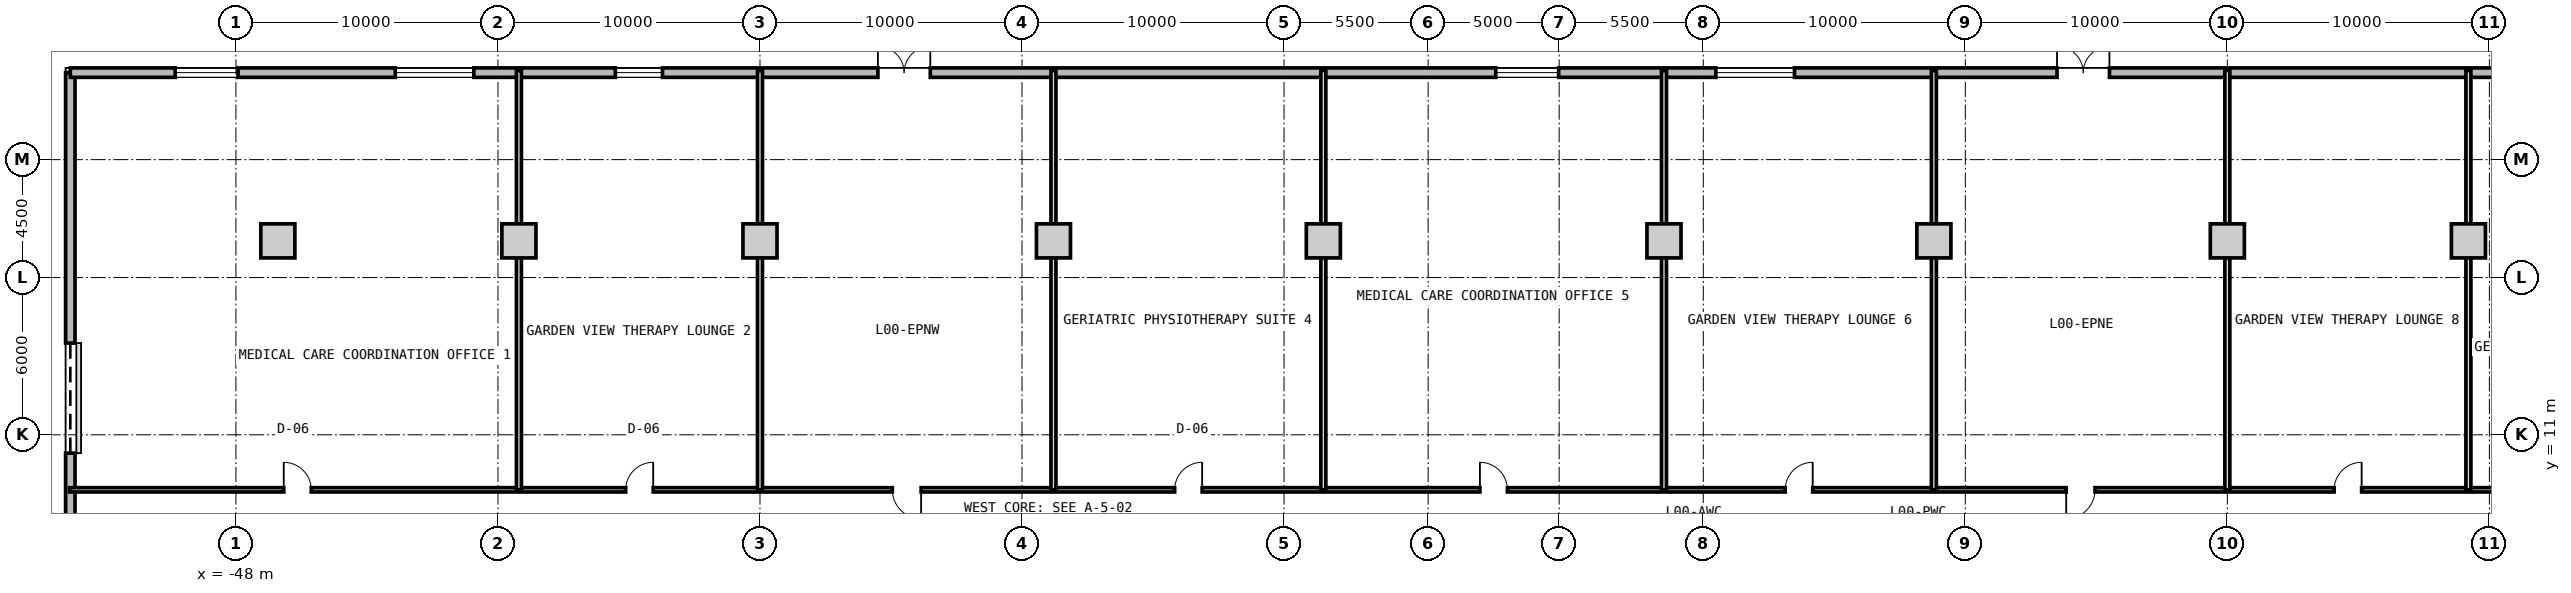
"""IFC4 building model, lengths in metres.
Left out: names, types, materials, properties, quantities, classifications, styles, units other than length and angle.
Written with IfcOpenShell. Run it as: python <this file> out.ifc"""

import sys

from ifc_helpers import new_model, si_unit, direction, frame, frame_2d, origin, origin_2d, place, context, subcontext, project, spatial, rectangle, extrude, source, transform, mapped, element, fill, save


model = new_model("IFC4")
c1 = context("Model", 3, precision=1e-05, world=origin(), true_north=direction((0.0, 1.0)))
c2 = subcontext(c1, "Body", "Model", "MODEL_VIEW")
j1 = project(units=[si_unit("LENGTHUNIT", "METRE"), si_unit("PLANEANGLEUNIT", "RADIAN")], contexts=[c1])
p1 = place(None, origin())
s1 = spatial("IfcSite", under=j1, at=p1, CompositionType="ELEMENT")
p2 = place(p1, origin())
s2 = spatial("IfcBuilding", under=s1, at=p2, CompositionType="ELEMENT")
p3 = place(p2, origin())
s3 = spatial("IfcBuildingStorey", under=s2, at=p3, CompositionType="ELEMENT", Elevation=0.0)
m1 = source(origin(), c2, "Body", "SweptSolid", [
    extrude(rectangle(XDim=1.3, YDim=1.3, at=origin_2d()), origin(), (0.0, 0.0, 1.0), 4.2),
])
for number, where, z_axis, x_axis in (
    (1, (-46.4, 18.4, 0.0), (0.0, 0.0, 1.0), (1.0, 0.0, 0.0)),
    (2, (-37.2, 18.4, 0.0), (0.0, 0.0, 1.0), (1.0, 0.0, 0.0)),
    (3, (-28.0, 18.4, 0.0), (0.0, 0.0, 1.0), (1.0, 0.0, 0.0)),
    (4, (-16.8, 18.4, 0.0), (0.0, 0.0, 1.0), (1.0, 0.0, 0.0)),
    (5, (-6.5, 18.4, 0.0), (0.0, 0.0, 1.0), (1.0, 0.0, 0.0)),
    (6, (6.5, 18.4, 0.0), (0.0, 0.0, 1.0), (1.0, 0.0, 0.0)),
    (7, (16.8, 18.4, 0.0), (0.0, 0.0, 1.0), (1.0, 0.0, 0.0)),
    (8, (28.0, 18.4, 0.0), (0.0, 0.0, 1.0), (1.0, 0.0, 0.0)),
    (9, (37.2, 18.4, 0.0), (0.0, 0.0, 1.0), (1.0, 0.0, 0.0)),
):
    element("IfcColumn", number, at=place(p3, frame(where, z_axis=z_axis, x_axis=x_axis)), inside=s3, PredefinedType="COLUMN", context=c2, shape_type="MappedRepresentation", body=[
        mapped(m1, transform((0.0, 0.0, 0.0), x_axis=(1.0, 0.0, 0.0), y_axis=(0.0, 1.0, 0.0), z_axis=(0.0, 0.0, 1.0), scale=1.0)),
    ])
m2 = source(origin(), c2, "Body", "SweptSolid", [
    extrude(rectangle(XDim=49.64, YDim=0.36, at=frame_2d((24.82, 0.0))), origin(), (0.0, 0.0, 1.0), 3.88),
])
p4 = place(p3, frame((-54.32, -24.82, 0.0), z_axis=(0.0, 0.0, 1.0), x_axis=(0.0, 1.0, 0.0)))
e10 = element("IfcWall", 10, at=p4, inside=s3, PredefinedType="SOLIDWALL", context=c2, shape_type="MappedRepresentation", body=[
    mapped(m2, transform((0.0, 0.0, 0.0), x_axis=(1.0, 0.0, 0.0), y_axis=(0.0, 1.0, 0.0), z_axis=(0.0, 0.0, 1.0), scale=1.0)),
])
p5 = place(p4, frame((14.62, 0.0, 0.0)))
e11 = element("IfcOpeningElement", 11, at=p5, cuts=e10, PredefinedType="OPENING", context=c2, shape_type="SweptSolid", body=[
    extrude(rectangle(XDim=4.2, YDim=2.7, at=frame_2d((2.1, 1.35))), frame((0.0, 0.19, 0.0), z_axis=(0.0, -1.0, 0.0), x_axis=(1.0, 0.0, 0.0)), (0.0, 0.0, 1.0), 0.38),
])
p6 = place(p4, frame((35.12, 0.0, 0.0)))
e12 = element("IfcOpeningElement", 12, at=p6, cuts=e10, PredefinedType="OPENING", context=c2, shape_type="SweptSolid", body=[
    extrude(rectangle(XDim=4.2, YDim=2.7, at=frame_2d((2.1, 1.35))), frame((0.0, 0.19, 0.0), z_axis=(0.0, -1.0, 0.0), x_axis=(1.0, 0.0, 0.0)), (0.0, 0.0, 1.0), 0.38),
])
m3 = source(origin(), c2, "Body", "SweptSolid", [
    extrude(rectangle(XDim=108.64, YDim=0.36, at=frame_2d((54.32, 0.0))), origin(), (0.0, 0.0, 1.0), 3.88),
])
p7 = place(p3, frame((-54.32, 24.82, 0.0), z_axis=(0.0, 0.0, 1.0), x_axis=(1.0, 0.0, 0.0)))
e13 = element("IfcWall", 13, at=p7, inside=s3, PredefinedType="SOLIDWALL", context=c2, shape_type="MappedRepresentation", body=[
    mapped(m3, transform((0.0, 0.0, 0.0), x_axis=(1.0, 0.0, 0.0), y_axis=(0.0, 1.0, 0.0), z_axis=(0.0, 0.0, 1.0), scale=1.0)),
])
p8 = place(p7, frame((30.82, 0.0, 0.0)))
e14 = element("IfcOpeningElement", 14, at=p8, cuts=e13, PredefinedType="OPENING", context=c2, shape_type="SweptSolid", body=[
    extrude(rectangle(XDim=2.0, YDim=2.3, at=frame_2d((1.0, 1.15))), frame((0.0, 0.19, 0.0), z_axis=(0.0, -1.0, 0.0), x_axis=(1.0, 0.0, 0.0)), (0.0, 0.0, 1.0), 0.38),
])
p9 = place(p7, frame((75.82, 0.0, 0.0)))
e15 = element("IfcOpeningElement", 15, at=p9, cuts=e13, PredefinedType="OPENING", context=c2, shape_type="SweptSolid", body=[
    extrude(rectangle(XDim=2.0, YDim=2.3, at=frame_2d((1.0, 1.15))), frame((0.0, 0.19, 0.0), z_axis=(0.0, -1.0, 0.0), x_axis=(1.0, 0.0, 0.0)), (0.0, 0.0, 1.0), 0.38),
])
p10 = place(p7, frame((4.0, 0.0, 0.85)))
e16 = element("IfcOpeningElement", 16, at=p10, cuts=e13, PredefinedType="OPENING", context=c2, shape_type="SweptSolid", body=[
    extrude(rectangle(XDim=2.4, YDim=2.2, at=frame_2d((1.2, 1.1))), frame((0.0, 0.19, 0.0), z_axis=(0.0, -1.0, 0.0), x_axis=(1.0, 0.0, 0.0)), (0.0, 0.0, 1.0), 0.38),
])
p11 = place(p7, frame((12.4, 0.0, 0.85)))
e17 = element("IfcOpeningElement", 17, at=p11, cuts=e13, PredefinedType="OPENING", context=c2, shape_type="SweptSolid", body=[
    extrude(rectangle(XDim=3.0, YDim=2.1, at=frame_2d((1.5, 1.05))), frame((0.0, 0.19, 0.0), z_axis=(0.0, -1.0, 0.0), x_axis=(1.0, 0.0, 0.0)), (0.0, 0.0, 1.0), 0.38),
])
p12 = place(p7, frame((20.8, 0.0, 0.9)))
e18 = element("IfcOpeningElement", 18, at=p12, cuts=e13, PredefinedType="OPENING", context=c2, shape_type="SweptSolid", body=[
    extrude(rectangle(XDim=1.8, YDim=2.0, at=frame_2d((0.9, 1.0))), frame((0.0, 0.19, 0.0), z_axis=(0.0, -1.0, 0.0), x_axis=(1.0, 0.0, 0.0)), (0.0, 0.0, 1.0), 0.38),
])
p13 = place(p7, frame((54.4, 0.0, 0.85)))
e19 = element("IfcOpeningElement", 19, at=p13, cuts=e13, PredefinedType="OPENING", context=c2, shape_type="SweptSolid", body=[
    extrude(rectangle(XDim=2.4, YDim=2.2, at=frame_2d((1.2, 1.1))), frame((0.0, 0.19, 0.0), z_axis=(0.0, -1.0, 0.0), x_axis=(1.0, 0.0, 0.0)), (0.0, 0.0, 1.0), 0.38),
])
p14 = place(p7, frame((62.8, 0.0, 0.85)))
e20 = element("IfcOpeningElement", 20, at=p14, cuts=e13, PredefinedType="OPENING", context=c2, shape_type="SweptSolid", body=[
    extrude(rectangle(XDim=3.0, YDim=2.1, at=frame_2d((1.5, 1.05))), frame((0.0, 0.19, 0.0), z_axis=(0.0, -1.0, 0.0), x_axis=(1.0, 0.0, 0.0)), (0.0, 0.0, 1.0), 0.38),
])
p15 = place(p7, frame((96.4, 0.0, 0.9)))
e21 = element("IfcOpeningElement", 21, at=p15, cuts=e13, PredefinedType="OPENING", context=c2, shape_type="SweptSolid", body=[
    extrude(rectangle(XDim=1.8, YDim=2.0, at=frame_2d((0.9, 1.0))), frame((0.0, 0.19, 0.0), z_axis=(0.0, -1.0, 0.0), x_axis=(1.0, 0.0, 0.0)), (0.0, 0.0, 1.0), 0.38),
])
m4 = source(origin(), c2, "Body", "SweptSolid", [
    extrude(rectangle(XDim=108.7, YDim=0.165, at=frame_2d((54.35, 0.0))), origin(), (0.0, 0.0, 1.0), 3.865),
])
p16 = place(p3, frame((-54.35, 8.9, 0.0), z_axis=(0.0, 0.0, 1.0), x_axis=(1.0, 0.0, 0.0)))
e22 = element("IfcWall", 22, at=p16, inside=s3, PredefinedType="PARTITIONING", context=c2, shape_type="MappedRepresentation", body=[
    mapped(m4, transform((0.0, 0.0, 0.0), x_axis=(1.0, 0.0, 0.0), y_axis=(0.0, 1.0, 0.0), z_axis=(0.0, 0.0, 1.0), scale=1.0)),
])
p17 = place(p16, frame((8.175, 0.0, 0.0)))
e23 = element("IfcOpeningElement", 23, at=p17, cuts=e22, PredefinedType="OPENING", context=c2, shape_type="SweptSolid", body=[
    extrude(rectangle(XDim=1.05, YDim=2.15, at=frame_2d((0.525, 1.075))), frame((0.0, 0.093, 0.0), z_axis=(0.0, -1.0, 0.0), x_axis=(1.0, 0.0, 0.0)), (0.0, 0.0, 1.0), 0.185),
])
p18 = place(p16, frame((21.225, 0.0, 0.0)))
e24 = element("IfcOpeningElement", 24, at=p18, cuts=e22, PredefinedType="OPENING", context=c2, shape_type="SweptSolid", body=[
    extrude(rectangle(XDim=1.05, YDim=2.15, at=frame_2d((0.525, 1.075))), frame((0.0, 0.093, 0.0), z_axis=(0.0, -1.0, 0.0), x_axis=(1.0, 0.0, 0.0)), (0.0, 0.0, 1.0), 0.185),
])
p19 = place(p16, frame((31.4, 0.0, 0.0)))
e25 = element("IfcOpeningElement", 25, at=p19, cuts=e22, PredefinedType="OPENING", context=c2, shape_type="SweptSolid", body=[
    extrude(rectangle(XDim=1.1, YDim=2.15, at=frame_2d((0.55, 1.075))), frame((0.0, 0.093, 0.0), z_axis=(0.0, -1.0, 0.0), x_axis=(1.0, 0.0, 0.0)), (0.0, 0.0, 1.0), 0.185),
])
p20 = place(p16, frame((42.175, 0.0, 0.0)))
e26 = element("IfcOpeningElement", 26, at=p20, cuts=e22, PredefinedType="OPENING", context=c2, shape_type="SweptSolid", body=[
    extrude(rectangle(XDim=1.05, YDim=2.15, at=frame_2d((0.525, 1.075))), frame((0.0, 0.093, 0.0), z_axis=(0.0, -1.0, 0.0), x_axis=(1.0, 0.0, 0.0)), (0.0, 0.0, 1.0), 0.185),
])
p21 = place(p16, frame((53.825, 0.0, 0.0)))
e27 = element("IfcOpeningElement", 27, at=p21, cuts=e22, PredefinedType="OPENING", context=c2, shape_type="SweptSolid", body=[
    extrude(rectangle(XDim=1.05, YDim=2.15, at=frame_2d((0.525, 1.075))), frame((0.0, 0.093, 0.0), z_axis=(0.0, -1.0, 0.0), x_axis=(1.0, 0.0, 0.0)), (0.0, 0.0, 1.0), 0.185),
])
p22 = place(p16, frame((65.475, 0.0, 0.0)))
e28 = element("IfcOpeningElement", 28, at=p22, cuts=e22, PredefinedType="OPENING", context=c2, shape_type="SweptSolid", body=[
    extrude(rectangle(XDim=1.05, YDim=2.15, at=frame_2d((0.525, 1.075))), frame((0.0, 0.093, 0.0), z_axis=(0.0, -1.0, 0.0), x_axis=(1.0, 0.0, 0.0)), (0.0, 0.0, 1.0), 0.185),
])
p23 = place(p16, frame((76.2, 0.0, 0.0)))
e29 = element("IfcOpeningElement", 29, at=p23, cuts=e22, PredefinedType="OPENING", context=c2, shape_type="SweptSolid", body=[
    extrude(rectangle(XDim=1.1, YDim=2.15, at=frame_2d((0.55, 1.075))), frame((0.0, 0.093, 0.0), z_axis=(0.0, -1.0, 0.0), x_axis=(1.0, 0.0, 0.0)), (0.0, 0.0, 1.0), 0.185),
])
p24 = place(p16, frame((86.425, 0.0, 0.0)))
e30 = element("IfcOpeningElement", 30, at=p24, cuts=e22, PredefinedType="OPENING", context=c2, shape_type="SweptSolid", body=[
    extrude(rectangle(XDim=1.05, YDim=2.15, at=frame_2d((0.525, 1.075))), frame((0.0, 0.093, 0.0), z_axis=(0.0, -1.0, 0.0), x_axis=(1.0, 0.0, 0.0)), (0.0, 0.0, 1.0), 0.185),
])
p25 = place(p16, frame((99.475, 0.0, 0.0)))
e31 = element("IfcOpeningElement", 31, at=p25, cuts=e22, PredefinedType="OPENING", context=c2, shape_type="SweptSolid", body=[
    extrude(rectangle(XDim=1.05, YDim=2.15, at=frame_2d((0.525, 1.075))), frame((0.0, 0.093, 0.0), z_axis=(0.0, -1.0, 0.0), x_axis=(1.0, 0.0, 0.0)), (0.0, 0.0, 1.0), 0.185),
])
m5 = source(origin(), c2, "Body", "SweptSolid", [
    extrude(rectangle(XDim=16.0, YDim=0.19, at=frame_2d((8.0, 0.0))), origin(), (0.0, 0.0, 1.0), 3.865),
])
for number, where, z_axis, x_axis in (
    (32, (-37.2, 8.9, 0.0), (0.0, 0.0, 1.0), (0.0, 1.0, 0.0)),
    (33, (-28.0, 8.9, 0.0), (0.0, 0.0, 1.0), (0.0, 1.0, 0.0)),
    (34, (-16.8, 8.9, 0.0), (0.0, 0.0, 1.0), (0.0, 1.0, 0.0)),
):
    element("IfcWall", number, at=place(p3, frame(where, z_axis=z_axis, x_axis=x_axis)), inside=s3, PredefinedType="PARTITIONING", context=c2, shape_type="MappedRepresentation", body=[
        mapped(m5, transform((0.0, 0.0, 0.0), x_axis=(1.0, 0.0, 0.0), y_axis=(0.0, 1.0, 0.0), z_axis=(0.0, 0.0, 1.0), scale=1.0)),
    ])
m6 = source(origin(), c2, "Body", "SweptSolid", [
    extrude(rectangle(XDim=16.0, YDim=0.19, at=frame_2d((8.0, 0.0))), origin(), (0.0, 0.0, 1.0), 3.215),
])
for number, where, z_axis, x_axis in (
    (35, (-6.5, 8.9, 0.0), (0.0, 0.0, 1.0), (0.0, 1.0, 0.0)),
    (36, (6.5, 8.9, 0.0), (0.0, 0.0, 1.0), (0.0, 1.0, 0.0)),
    (37, (16.8, 8.9, 0.0), (0.0, 0.0, 1.0), (0.0, 1.0, 0.0)),
):
    element("IfcWall", number, at=place(p3, frame(where, z_axis=z_axis, x_axis=x_axis)), inside=s3, PredefinedType="PARTITIONING", context=c2, shape_type="MappedRepresentation", body=[
        mapped(m6, transform((0.0, 0.0, 0.0), x_axis=(1.0, 0.0, 0.0), y_axis=(0.0, 1.0, 0.0), z_axis=(0.0, 0.0, 1.0), scale=1.0)),
    ])
for number, where, z_axis, x_axis in (
    (38, (28.0, 8.9, 0.0), (0.0, 0.0, 1.0), (0.0, 1.0, 0.0)),
    (39, (37.2, 8.9, 0.0), (0.0, 0.0, 1.0), (0.0, 1.0, 0.0)),
):
    element("IfcWall", number, at=place(p3, frame(where, z_axis=z_axis, x_axis=x_axis)), inside=s3, PredefinedType="PARTITIONING", context=c2, shape_type="MappedRepresentation", body=[
        mapped(m5, transform((0.0, 0.0, 0.0), x_axis=(1.0, 0.0, 0.0), y_axis=(0.0, 1.0, 0.0), z_axis=(0.0, 0.0, 1.0), scale=1.0)),
    ])
m7 = source(origin(), c2, "Body", "SweptSolid", [
    extrude(rectangle(XDim=2.0, YDim=2.3, at=frame_2d((1.0, 1.15))), frame((0.0, 0.025, 0.0), z_axis=(0.0, -1.0, 0.0), x_axis=(1.0, 0.0, 0.0)), (0.0, 0.0, 1.0), 0.05),
])
p26 = place(p8, origin())
e40 = element("IfcDoor", 40, at=p26, inside=s3, OperationType="DOUBLE_DOOR_SINGLE_SWING", PredefinedType="DOOR", context=c2, shape_type="MappedRepresentation", body=[
    mapped(m7, transform((0.0, 0.0, 0.0), x_axis=(1.0, 0.0, 0.0), y_axis=(0.0, 1.0, 0.0), z_axis=(0.0, 0.0, 1.0), scale=1.0)),
])
fill(e14, e40)
p27 = place(p9, origin())
e41 = element("IfcDoor", 41, at=p27, inside=s3, OperationType="DOUBLE_DOOR_SINGLE_SWING", PredefinedType="DOOR", context=c2, shape_type="MappedRepresentation", body=[
    mapped(m7, transform((0.0, 0.0, 0.0), x_axis=(1.0, 0.0, 0.0), y_axis=(0.0, 1.0, 0.0), z_axis=(0.0, 0.0, 1.0), scale=1.0)),
])
fill(e15, e41)
m8 = source(origin(), c2, "Body", "SweptSolid", [
    extrude(rectangle(XDim=4.2, YDim=2.7, at=frame_2d((2.1, 1.35))), frame((0.0, 0.025, 0.0), z_axis=(0.0, -1.0, 0.0), x_axis=(1.0, 0.0, 0.0)), (0.0, 0.0, 1.0), 0.05),
])
p28 = place(p6, origin())
e42 = element("IfcDoor", 42, at=p28, inside=s3, OperationType="ROLLINGUP", PredefinedType="GATE", context=c2, shape_type="MappedRepresentation", body=[
    mapped(m8, transform((0.0, 0.0, 0.0), x_axis=(1.0, 0.0, 0.0), y_axis=(0.0, 1.0, 0.0), z_axis=(0.0, 0.0, 1.0), scale=1.0)),
])
fill(e12, e42)
m9 = source(origin(), c2, "Body", "SweptSolid", [
    extrude(rectangle(XDim=2.4, YDim=2.2, at=frame_2d((1.2, 1.1))), frame((0.0, 0.03, 0.0), z_axis=(0.0, -1.0, 0.0), x_axis=(1.0, 0.0, 0.0)), (0.0, 0.0, 1.0), 0.06),
])
p29 = place(p10, origin())
e43 = element("IfcWindow", 43, at=p29, inside=s3, PartitioningType="SINGLE_PANEL", PredefinedType="WINDOW", context=c2, shape_type="MappedRepresentation", body=[
    mapped(m9, transform((0.0, 0.0, 0.0), x_axis=(1.0, 0.0, 0.0), y_axis=(0.0, 1.0, 0.0), z_axis=(0.0, 0.0, 1.0), scale=1.0)),
])
fill(e16, e43)
m10 = source(origin(), c2, "Body", "SweptSolid", [
    extrude(rectangle(XDim=3.0, YDim=2.1, at=frame_2d((1.5, 1.05))), frame((0.0, 0.03, 0.0), z_axis=(0.0, -1.0, 0.0), x_axis=(1.0, 0.0, 0.0)), (0.0, 0.0, 1.0), 0.06),
])
p30 = place(p11, origin())
e44 = element("IfcWindow", 44, at=p30, inside=s3, PartitioningType="SINGLE_PANEL", PredefinedType="WINDOW", context=c2, shape_type="MappedRepresentation", body=[
    mapped(m10, transform((0.0, 0.0, 0.0), x_axis=(1.0, 0.0, 0.0), y_axis=(0.0, 1.0, 0.0), z_axis=(0.0, 0.0, 1.0), scale=1.0)),
])
fill(e17, e44)
m11 = source(origin(), c2, "Body", "SweptSolid", [
    extrude(rectangle(XDim=1.8, YDim=2.0, at=frame_2d((0.9, 1.0))), frame((0.0, 0.03, 0.0), z_axis=(0.0, -1.0, 0.0), x_axis=(1.0, 0.0, 0.0)), (0.0, 0.0, 1.0), 0.06),
])
p31 = place(p12, origin())
e45 = element("IfcWindow", 45, at=p31, inside=s3, PartitioningType="SINGLE_PANEL", PredefinedType="WINDOW", context=c2, shape_type="MappedRepresentation", body=[
    mapped(m11, transform((0.0, 0.0, 0.0), x_axis=(1.0, 0.0, 0.0), y_axis=(0.0, 1.0, 0.0), z_axis=(0.0, 0.0, 1.0), scale=1.0)),
])
fill(e18, e45)
p32 = place(p13, origin())
e46 = element("IfcWindow", 46, at=p32, inside=s3, PartitioningType="SINGLE_PANEL", PredefinedType="WINDOW", context=c2, shape_type="MappedRepresentation", body=[
    mapped(m9, transform((0.0, 0.0, 0.0), x_axis=(1.0, 0.0, 0.0), y_axis=(0.0, 1.0, 0.0), z_axis=(0.0, 0.0, 1.0), scale=1.0)),
])
fill(e19, e46)
p33 = place(p14, origin())
e47 = element("IfcWindow", 47, at=p33, inside=s3, PartitioningType="SINGLE_PANEL", PredefinedType="WINDOW", context=c2, shape_type="MappedRepresentation", body=[
    mapped(m10, transform((0.0, 0.0, 0.0), x_axis=(1.0, 0.0, 0.0), y_axis=(0.0, 1.0, 0.0), z_axis=(0.0, 0.0, 1.0), scale=1.0)),
])
fill(e20, e47)
m12 = source(origin(), c2, "Body", "SweptSolid", [
    extrude(rectangle(XDim=1.05, YDim=2.15, at=frame_2d((0.525, 1.075))), frame((0.0, 0.025, 0.0), z_axis=(0.0, -1.0, 0.0), x_axis=(1.0, 0.0, 0.0)), (0.0, 0.0, 1.0), 0.05),
])
p34 = place(p17, origin())
e48 = element("IfcDoor", 48, at=p34, inside=s3, OperationType="SINGLE_SWING_LEFT", PredefinedType="DOOR", context=c2, shape_type="MappedRepresentation", body=[
    mapped(m12, transform((0.0, 0.0, 0.0), x_axis=(1.0, 0.0, 0.0), y_axis=(0.0, 1.0, 0.0), z_axis=(0.0, 0.0, 1.0), scale=1.0)),
])
fill(e23, e48)
p35 = place(p18, origin())
e49 = element("IfcDoor", 49, at=p35, inside=s3, OperationType="SINGLE_SWING_RIGHT", PredefinedType="DOOR", context=c2, shape_type="MappedRepresentation", body=[
    mapped(m12, transform((0.0, 0.0, 0.0), x_axis=(1.0, 0.0, 0.0), y_axis=(0.0, 1.0, 0.0), z_axis=(0.0, 0.0, 1.0), scale=1.0)),
])
fill(e24, e49)
m13 = source(origin(), c2, "Body", "SweptSolid", [
    extrude(rectangle(XDim=1.1, YDim=2.15, at=frame_2d((0.55, 1.075))), frame((0.0, 0.025, 0.0), z_axis=(0.0, -1.0, 0.0), x_axis=(1.0, 0.0, 0.0)), (0.0, 0.0, 1.0), 0.05),
])
p36 = place(p19, frame((1.1, 0.0, 0.0), z_axis=(0.0, 0.0, 1.0), x_axis=(-1.0, 0.0, 0.0)))
e50 = element("IfcDoor", 50, at=p36, inside=s3, OperationType="SINGLE_SWING_LEFT", PredefinedType="DOOR", context=c2, shape_type="MappedRepresentation", body=[
    mapped(m13, transform((0.0, 0.0, 0.0), x_axis=(1.0, 0.0, 0.0), y_axis=(0.0, 1.0, 0.0), z_axis=(0.0, 0.0, 1.0), scale=1.0)),
])
fill(e25, e50)
p37 = place(p20, origin())
e51 = element("IfcDoor", 51, at=p37, inside=s3, OperationType="SINGLE_SWING_RIGHT", PredefinedType="DOOR", context=c2, shape_type="MappedRepresentation", body=[
    mapped(m12, transform((0.0, 0.0, 0.0), x_axis=(1.0, 0.0, 0.0), y_axis=(0.0, 1.0, 0.0), z_axis=(0.0, 0.0, 1.0), scale=1.0)),
])
fill(e26, e51)
p38 = place(p21, origin())
e52 = element("IfcDoor", 52, at=p38, inside=s3, OperationType="SINGLE_SWING_LEFT", PredefinedType="DOOR", context=c2, shape_type="MappedRepresentation", body=[
    mapped(m12, transform((0.0, 0.0, 0.0), x_axis=(1.0, 0.0, 0.0), y_axis=(0.0, 1.0, 0.0), z_axis=(0.0, 0.0, 1.0), scale=1.0)),
])
fill(e27, e52)
p39 = place(p22, origin())
e53 = element("IfcDoor", 53, at=p39, inside=s3, OperationType="SINGLE_SWING_RIGHT", PredefinedType="DOOR", context=c2, shape_type="MappedRepresentation", body=[
    mapped(m12, transform((0.0, 0.0, 0.0), x_axis=(1.0, 0.0, 0.0), y_axis=(0.0, 1.0, 0.0), z_axis=(0.0, 0.0, 1.0), scale=1.0)),
])
fill(e28, e53)
p40 = place(p23, frame((1.1, 0.0, 0.0), z_axis=(0.0, 0.0, 1.0), x_axis=(-1.0, 0.0, 0.0)))
e54 = element("IfcDoor", 54, at=p40, inside=s3, OperationType="SINGLE_SWING_RIGHT", PredefinedType="DOOR", context=c2, shape_type="MappedRepresentation", body=[
    mapped(m13, transform((0.0, 0.0, 0.0), x_axis=(1.0, 0.0, 0.0), y_axis=(0.0, 1.0, 0.0), z_axis=(0.0, 0.0, 1.0), scale=1.0)),
])
fill(e29, e54)
p41 = place(p24, origin())
e55 = element("IfcDoor", 55, at=p41, inside=s3, OperationType="SINGLE_SWING_RIGHT", PredefinedType="DOOR", context=c2, shape_type="MappedRepresentation", body=[
    mapped(m12, transform((0.0, 0.0, 0.0), x_axis=(1.0, 0.0, 0.0), y_axis=(0.0, 1.0, 0.0), z_axis=(0.0, 0.0, 1.0), scale=1.0)),
])
fill(e30, e55)
save(model, sys.argv[1])
